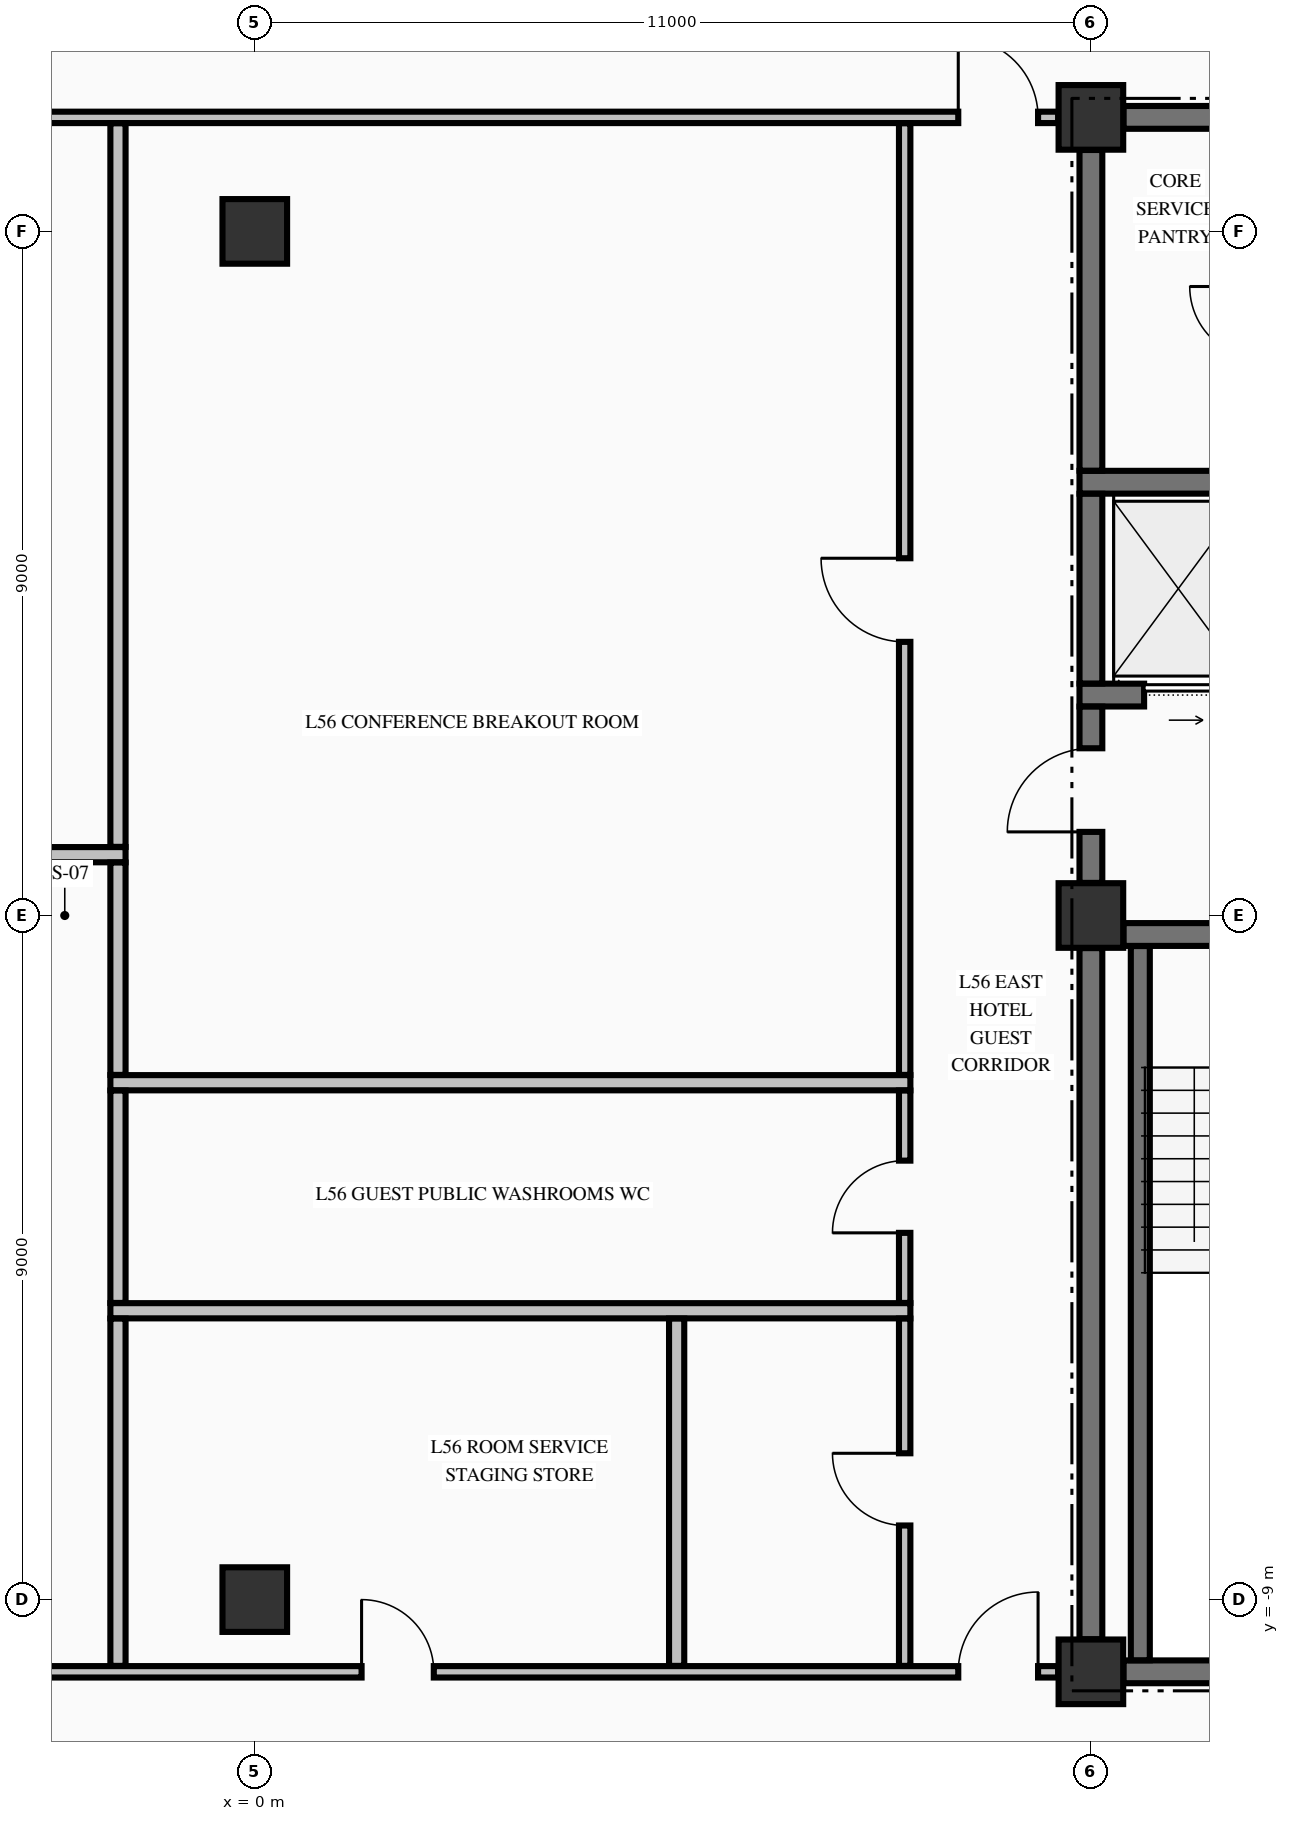
"""IFC4 building model, lengths in metres.
Left out: names, types, materials, properties, quantities, classifications, styles, units other than length and angle.
Written with IfcOpenShell. Run it as: python <this file> out.ifc"""

import sys

from ifc_helpers import new_model, si_unit, direction, frame, frame_2d, origin, origin_2d, place, context, subcontext, project, spatial, rectangle, extrude, element, fill, save


model = new_model("IFC4")
c1 = context("Model", 3, precision=1e-05, world=origin(), true_north=direction((0.0, 1.0)))
c2 = subcontext(c1, "Body", "Model", "MODEL_VIEW")
j1 = project(units=[si_unit("LENGTHUNIT", "METRE"), si_unit("PLANEANGLEUNIT", "RADIAN")], contexts=[c1])
p1 = place(None, origin())
s1 = spatial("IfcSite", under=j1, at=p1, CompositionType="ELEMENT")
p2 = place(p1, origin())
s2 = spatial("IfcBuilding", under=s1, at=p2, CompositionType="ELEMENT")
p3 = place(p2, frame((0.0, 0.0, 215.26)))
s3 = spatial("IfcBuildingStorey", under=s2, at=p3, CompositionType="ELEMENT", Elevation=215.26)
for number, where, z_axis, x_axis in (
    (1, (11.0, -9.95, -0.25), (0.0, 0.0, 1.0), (1.0, 0.0, 0.0)),
    (2, (11.0, 0.0, -0.25), (0.0, 0.0, 1.0), (1.0, 0.0, 0.0)),
    (3, (11.0, 10.5, -0.25), (0.0, 0.0, 1.0), (1.0, 0.0, 0.0)),
    (4, (0.0, -9.0, -0.25), (0.0, 0.0, 1.0), (1.0, 0.0, 0.0)),
    (5, (0.0, 9.0, -0.25), (0.0, 0.0, 1.0), (1.0, 0.0, 0.0)),
):
    element("IfcColumn", number, at=place(p3, frame(where, z_axis=z_axis, x_axis=x_axis)), inside=s3, PredefinedType="COLUMN", context=c2, shape_type="SweptSolid", body=[
        extrude(rectangle(XDim=0.85, YDim=0.85, at=origin_2d()), origin(), (0.0, 0.0, 1.0), 3.4),
    ])
p4 = place(p3, frame((11.429, -9.95, 0.0), z_axis=(0.0, 0.0, 1.0), x_axis=(1.0, 0.0, 0.0)))
e6 = element("IfcWall", 6, at=p4, inside=s3, PredefinedType="SHEAR", context=c2, shape_type="SweptSolid", body=[
    extrude(rectangle(XDim=3.271, YDim=0.3, at=frame_2d((1.635, 0.0))), origin(), (0.0, 0.0, 1.0), 3.15),
])
p5 = place(p3, frame((11.429, -0.25, 0.0), z_axis=(0.0, 0.0, 1.0), x_axis=(1.0, 0.0, 0.0)))
e7 = element("IfcWall", 7, at=p5, inside=s3, PredefinedType="SHEAR", context=c2, shape_type="SweptSolid", body=[
    extrude(rectangle(XDim=3.446, YDim=0.3, at=frame_2d((1.723, 0.0))), origin(), (0.0, 0.0, 1.0), 3.15),
])
p6 = place(p5, frame((1.171, 0.0, 0.0)))
e8 = element("IfcOpeningElement", 8, at=p6, cuts=e7, PredefinedType="OPENING", context=c2, shape_type="SweptSolid", body=[
    extrude(rectangle(XDim=1.1, YDim=2.15, at=frame_2d((0.55, 1.075))), frame((0.0, 0.16, 0.0), z_axis=(0.0, -1.0, 0.0), x_axis=(1.0, 0.0, 0.0)), (0.0, 0.0, 1.0), 0.32),
])
p7 = place(p3, frame((10.85, 2.9, 0.0), z_axis=(0.0, 0.0, 1.0), x_axis=(1.0, 0.0, 0.0)))
e9 = element("IfcWall", 9, at=p7, inside=s3, PredefinedType="SHEAR", context=c2, shape_type="SweptSolid", body=[
    extrude(rectangle(XDim=4.025, YDim=0.3, at=frame_2d((2.012, 0.0))), origin(), (0.0, 0.0, 1.0), 3.15),
])
p8 = place(p7, frame((0.85, 0.0, 0.0)))
e10 = element("IfcOpeningElement", 10, at=p8, cuts=e9, PredefinedType="OPENING", context=c2, shape_type="SweptSolid", body=[
    extrude(rectangle(XDim=1.1, YDim=2.2, at=frame_2d((0.55, 1.1))), frame((0.0, 0.16, 0.0), z_axis=(0.0, -1.0, 0.0), x_axis=(1.0, 0.0, 0.0)), (0.0, 0.0, 1.0), 0.32),
])
p9 = place(p3, frame((10.85, 5.7, 0.0), z_axis=(0.0, 0.0, 1.0), x_axis=(1.0, 0.0, 0.0)))
e11 = element("IfcWall", 11, at=p9, inside=s3, PredefinedType="SHEAR", context=c2, shape_type="SweptSolid", body=[
    extrude(rectangle(XDim=4.025, YDim=0.3, at=frame_2d((2.012, 0.0))), origin(), (0.0, 0.0, 1.0), 3.15),
])
p10 = place(p3, frame((11.429, 10.5, 0.0), z_axis=(0.0, 0.0, 1.0), x_axis=(1.0, 0.0, 0.0)))
e12 = element("IfcWall", 12, at=p10, inside=s3, PredefinedType="SHEAR", context=c2, shape_type="SweptSolid", body=[
    extrude(rectangle(XDim=3.271, YDim=0.3, at=frame_2d((1.635, 0.0))), origin(), (0.0, 0.0, 1.0), 3.15),
])
p11 = place(p10, frame((2.076, 0.0, 0.0)))
e13 = element("IfcOpeningElement", 13, at=p11, cuts=e12, PredefinedType="OPENING", context=c2, shape_type="SweptSolid", body=[
    extrude(rectangle(XDim=0.95, YDim=2.15, at=frame_2d((0.475, 1.075))), frame((0.0, 0.16, 0.0), z_axis=(0.0, -1.0, 0.0), x_axis=(1.0, 0.0, 0.0)), (0.0, 0.0, 1.0), 0.32),
])
p12 = place(p3, frame((-10.569, -9.95, 0.0), z_axis=(0.0, 0.0, 1.0), x_axis=(1.0, 0.0, 0.0)))
e14 = element("IfcWall", 14, at=p12, inside=s3, PredefinedType="PARTITIONING", context=c2, shape_type="SweptSolid", body=[
    extrude(rectangle(XDim=21.138, YDim=0.15, at=frame_2d((10.569, 0.0))), origin(), (0.0, 0.0, 1.0), 3.15),
])
p13 = place(p12, frame((0.264, 0.0, 0.0)))
e15 = element("IfcOpeningElement", 15, at=p13, cuts=e14, PredefinedType="OPENING", context=c2, shape_type="SweptSolid", body=[
    extrude(rectangle(XDim=1.05, YDim=2.15, at=frame_2d((0.525, 1.075))), frame((0.0, 0.085, 0.0), z_axis=(0.0, -1.0, 0.0), x_axis=(1.0, 0.0, 0.0)), (0.0, 0.0, 1.0), 0.17),
])
p14 = place(p12, frame((19.824, 0.0, 0.0)))
e16 = element("IfcOpeningElement", 16, at=p14, cuts=e14, PredefinedType="OPENING", context=c2, shape_type="SweptSolid", body=[
    extrude(rectangle(XDim=1.05, YDim=2.15, at=frame_2d((0.525, 1.075))), frame((0.0, 0.085, 0.0), z_axis=(0.0, -1.0, 0.0), x_axis=(1.0, 0.0, 0.0)), (0.0, 0.0, 1.0), 0.17),
])
p15 = place(p12, frame((11.974, 0.0, 0.0)))
e17 = element("IfcOpeningElement", 17, at=p15, cuts=e14, PredefinedType="OPENING", context=c2, shape_type="SweptSolid", body=[
    extrude(rectangle(XDim=0.95, YDim=2.15, at=frame_2d((0.475, 1.075))), frame((0.0, 0.085, 0.0), z_axis=(0.0, -1.0, 0.0), x_axis=(1.0, 0.0, 0.0)), (0.0, 0.0, 1.0), 0.17),
])
for number, where, z_axis, x_axis in (
    (18, (-1.9, -5.2, 0.0), (0.0, 0.0, 1.0), (1.0, 0.0, 0.0)),
    (19, (-1.9, -2.2, 0.0), (0.0, 0.0, 1.0), (1.0, 0.0, 0.0)),
):
    element("IfcWall", number, at=place(p3, frame(where, z_axis=z_axis, x_axis=x_axis)), inside=s3, PredefinedType="PARTITIONING", context=c2, shape_type="SweptSolid", body=[
        extrude(rectangle(XDim=10.525, YDim=0.2, at=frame_2d((5.262, 0.0))), origin(), (0.0, 0.0, 1.0), 3.15),
    ])
p16 = place(p3, frame((-8.625, 0.8, 0.0), z_axis=(0.0, 0.0, 1.0), x_axis=(1.0, 0.0, 0.0)))
e20 = element("IfcWall", 20, at=p16, inside=s3, PredefinedType="PARTITIONING", context=c2, shape_type="SweptSolid", body=[
    extrude(rectangle(XDim=6.925, YDim=0.2, at=frame_2d((3.462, 0.0))), origin(), (0.0, 0.0, 1.0), 3.15),
])
p17 = place(p3, frame((-10.569, 10.5, 0.0), z_axis=(0.0, 0.0, 1.0), x_axis=(1.0, 0.0, 0.0)))
e21 = element("IfcWall", 21, at=p17, inside=s3, PredefinedType="PARTITIONING", context=c2, shape_type="SweptSolid", body=[
    extrude(rectangle(XDim=21.138, YDim=0.15, at=frame_2d((10.569, 0.0))), origin(), (0.0, 0.0, 1.0), 3.15),
])
p18 = place(p17, frame((0.264, 0.0, 0.0)))
e22 = element("IfcOpeningElement", 22, at=p18, cuts=e21, PredefinedType="OPENING", context=c2, shape_type="SweptSolid", body=[
    extrude(rectangle(XDim=1.05, YDim=2.15, at=frame_2d((0.525, 1.075))), frame((0.0, 0.085, 0.0), z_axis=(0.0, -1.0, 0.0), x_axis=(1.0, 0.0, 0.0)), (0.0, 0.0, 1.0), 0.17),
])
p19 = place(p17, frame((19.824, 0.0, 0.0)))
e23 = element("IfcOpeningElement", 23, at=p19, cuts=e21, PredefinedType="OPENING", context=c2, shape_type="SweptSolid", body=[
    extrude(rectangle(XDim=1.05, YDim=2.15, at=frame_2d((0.525, 1.075))), frame((0.0, 0.085, 0.0), z_axis=(0.0, -1.0, 0.0), x_axis=(1.0, 0.0, 0.0)), (0.0, 0.0, 1.0), 0.17),
])
p20 = place(p3, frame((11.0, -9.521, 0.0), z_axis=(0.0, 0.0, 1.0), x_axis=(0.0, 1.0, 0.0)))
e24 = element("IfcWall", 24, at=p20, inside=s3, PredefinedType="SHEAR", context=c2, shape_type="SweptSolid", body=[
    extrude(rectangle(XDim=9.092, YDim=0.3, at=frame_2d((4.546, 0.0))), origin(), (0.0, 0.0, 1.0), 3.15),
])
p21 = place(p3, frame((11.0, 0.429, 0.0), z_axis=(0.0, 0.0, 1.0), x_axis=(0.0, 1.0, 0.0)))
e25 = element("IfcWall", 25, at=p21, inside=s3, PredefinedType="SHEAR", context=c2, shape_type="SweptSolid", body=[
    extrude(rectangle(XDim=2.319, YDim=0.3, at=frame_2d((1.16, 0.0))), origin(), (0.0, 0.0, 1.0), 3.15),
])
p22 = place(p21, frame((0.671, 0.0, 0.0)))
e26 = element("IfcOpeningElement", 26, at=p22, cuts=e25, PredefinedType="OPENING", context=c2, shape_type="SweptSolid", body=[
    extrude(rectangle(XDim=1.1, YDim=2.15, at=frame_2d((0.55, 1.075))), frame((0.0, 0.16, 0.0), z_axis=(0.0, -1.0, 0.0), x_axis=(1.0, 0.0, 0.0)), (0.0, 0.0, 1.0), 0.32),
])
p23 = place(p3, frame((11.0, 3.052, 0.0), z_axis=(0.0, 0.0, 1.0), x_axis=(0.0, 1.0, 0.0)))
e27 = element("IfcWall", 27, at=p23, inside=s3, PredefinedType="SHEAR", context=c2, shape_type="SweptSolid", body=[
    extrude(rectangle(XDim=2.496, YDim=0.3, at=frame_2d((1.248, 0.0))), origin(), (0.0, 0.0, 1.0), 3.15),
])
p24 = place(p3, frame((11.0, 5.852, 0.0), z_axis=(0.0, 0.0, 1.0), x_axis=(0.0, 1.0, 0.0)))
e28 = element("IfcWall", 28, at=p24, inside=s3, PredefinedType="SHEAR", context=c2, shape_type="SweptSolid", body=[
    extrude(rectangle(XDim=4.219, YDim=0.3, at=frame_2d((2.109, 0.0))), origin(), (0.0, 0.0, 1.0), 3.15),
])
p25 = place(p3, frame((11.65, -9.798, 0.0), z_axis=(0.0, 0.0, 1.0), x_axis=(0.0, 1.0, 0.0)))
e29 = element("IfcWall", 29, at=p25, inside=s3, PredefinedType="SOLIDWALL", context=c2, shape_type="SweptSolid", body=[
    extrude(rectangle(XDim=9.396, YDim=0.25, at=frame_2d((4.698, 0.0))), origin(), (0.0, 0.0, 1.0), 3.15),
])
p26 = place(p3, frame((-1.8, -9.872, 0.0), z_axis=(0.0, 0.0, 1.0), x_axis=(0.0, 1.0, 0.0)))
e30 = element("IfcWall", 30, at=p26, inside=s3, PredefinedType="PARTITIONING", context=c2, shape_type="SweptSolid", body=[
    extrude(rectangle(XDim=4.569, YDim=0.2, at=frame_2d((2.285, 0.0))), origin(), (0.0, 0.0, 1.0), 3.15),
])
for number, where, z_axis, x_axis in (
    (31, (-1.8, -5.097, 0.0), (0.0, 0.0, 1.0), (0.0, 1.0, 0.0)),
    (32, (-1.8, -2.097, 0.0), (0.0, 0.0, 1.0), (0.0, 1.0, 0.0)),
):
    element("IfcWall", number, at=place(p3, frame(where, z_axis=z_axis, x_axis=x_axis)), inside=s3, PredefinedType="PARTITIONING", context=c2, shape_type="SweptSolid", body=[
        extrude(rectangle(XDim=2.794, YDim=0.2, at=frame_2d((1.397, 0.0))), origin(), (0.0, 0.0, 1.0), 3.15),
    ])
p27 = place(p3, frame((-1.8, 0.903, 0.0), z_axis=(0.0, 0.0, 1.0), x_axis=(0.0, 1.0, 0.0)))
e33 = element("IfcWall", 33, at=p27, inside=s3, PredefinedType="PARTITIONING", context=c2, shape_type="SweptSolid", body=[
    extrude(rectangle(XDim=9.519, YDim=0.2, at=frame_2d((4.76, 0.0))), origin(), (0.0, 0.0, 1.0), 3.15),
])
p28 = place(p3, frame((5.55, -9.872, 0.0), z_axis=(0.0, 0.0, 1.0), x_axis=(0.0, 1.0, 0.0)))
e34 = element("IfcWall", 34, at=p28, inside=s3, PredefinedType="PARTITIONING", context=c2, shape_type="SweptSolid", body=[
    extrude(rectangle(XDim=4.569, YDim=0.2, at=frame_2d((2.285, 0.0))), origin(), (0.0, 0.0, 1.0), 3.15),
])
p29 = place(p3, frame((8.55, -9.872, 0.0), z_axis=(0.0, 0.0, 1.0), x_axis=(0.0, 1.0, 0.0)))
e35 = element("IfcWall", 35, at=p29, inside=s3, PredefinedType="PARTITIONING", context=c2, shape_type="SweptSolid", body=[
    extrude(rectangle(XDim=4.569, YDim=0.15, at=frame_2d((2.285, 0.0))), origin(), (0.0, 0.0, 1.0), 3.15),
])
p30 = place(p29, frame((1.847, 0.0, 0.0)))
e36 = element("IfcOpeningElement", 36, at=p30, cuts=e35, PredefinedType="OPENING", context=c2, shape_type="SweptSolid", body=[
    extrude(rectangle(XDim=0.95, YDim=2.15, at=frame_2d((0.475, 1.075))), frame((0.0, 0.085, 0.0), z_axis=(0.0, -1.0, 0.0), x_axis=(1.0, 0.0, 0.0)), (0.0, 0.0, 1.0), 0.17),
])
p31 = place(p3, frame((8.55, -5.097, 0.0), z_axis=(0.0, 0.0, 1.0), x_axis=(0.0, 1.0, 0.0)))
e37 = element("IfcWall", 37, at=p31, inside=s3, PredefinedType="PARTITIONING", context=c2, shape_type="SweptSolid", body=[
    extrude(rectangle(XDim=2.794, YDim=0.15, at=frame_2d((1.397, 0.0))), origin(), (0.0, 0.0, 1.0), 3.15),
])
p32 = place(p31, frame((0.922, 0.0, 0.0)))
e38 = element("IfcOpeningElement", 38, at=p32, cuts=e37, PredefinedType="OPENING", context=c2, shape_type="SweptSolid", body=[
    extrude(rectangle(XDim=0.95, YDim=2.15, at=frame_2d((0.475, 1.075))), frame((0.0, 0.085, 0.0), z_axis=(0.0, -1.0, 0.0), x_axis=(1.0, 0.0, 0.0)), (0.0, 0.0, 1.0), 0.17),
])
p33 = place(p3, frame((8.55, -2.097, 0.0), z_axis=(0.0, 0.0, 1.0), x_axis=(0.0, 1.0, 0.0)))
e39 = element("IfcWall", 39, at=p33, inside=s3, PredefinedType="PARTITIONING", context=c2, shape_type="SweptSolid", body=[
    extrude(rectangle(XDim=12.519, YDim=0.15, at=frame_2d((6.26, 0.0))), origin(), (0.0, 0.0, 1.0), 3.15),
])
p34 = place(p33, frame((5.697, 0.0, 0.0)))
e40 = element("IfcOpeningElement", 40, at=p34, cuts=e39, PredefinedType="OPENING", context=c2, shape_type="SweptSolid", body=[
    extrude(rectangle(XDim=1.1, YDim=2.15, at=frame_2d((0.55, 1.075))), frame((0.0, 0.085, 0.0), z_axis=(0.0, -1.0, 0.0), x_axis=(1.0, 0.0, 0.0)), (0.0, 0.0, 1.0), 0.17),
])
p35 = place(p22, origin())
e41 = element("IfcDoor", 41, at=p35, inside=s3, OperationType="SINGLE_SWING_LEFT", PredefinedType="DOOR", context=c2, shape_type="SweptSolid", body=[
    extrude(rectangle(XDim=1.1, YDim=2.15, at=frame_2d((0.55, 1.075))), frame((0.0, 0.025, 0.0), z_axis=(0.0, -1.0, 0.0), x_axis=(1.0, 0.0, 0.0)), (0.0, 0.0, 1.0), 0.05),
])
fill(e26, e41)
p36 = place(p8, origin())
e42 = element("IfcDoor", 42, at=p36, inside=s3, OperationType="SLIDING_TO_RIGHT", PredefinedType="DOOR", context=c2, shape_type="SweptSolid", body=[
    extrude(rectangle(XDim=1.1, YDim=2.2, at=frame_2d((0.55, 1.1))), frame((0.0, 0.025, 0.0), z_axis=(0.0, -1.0, 0.0), x_axis=(1.0, 0.0, 0.0)), (0.0, 0.0, 1.0), 0.05),
])
fill(e10, e42)
p37 = place(p19, origin())
e43 = element("IfcDoor", 43, at=p37, inside=s3, OperationType="SINGLE_SWING_LEFT", PredefinedType="DOOR", context=c2, shape_type="SweptSolid", body=[
    extrude(rectangle(XDim=1.05, YDim=2.15, at=frame_2d((0.525, 1.075))), frame((0.0, 0.025, 0.0), z_axis=(0.0, -1.0, 0.0), x_axis=(1.0, 0.0, 0.0)), (0.0, 0.0, 1.0), 0.05),
])
fill(e23, e43)
p38 = place(p14, origin())
e44 = element("IfcDoor", 44, at=p38, inside=s3, OperationType="SINGLE_SWING_RIGHT", PredefinedType="DOOR", context=c2, shape_type="SweptSolid", body=[
    extrude(rectangle(XDim=1.05, YDim=2.15, at=frame_2d((0.525, 1.075))), frame((0.0, 0.025, 0.0), z_axis=(0.0, -1.0, 0.0), x_axis=(1.0, 0.0, 0.0)), (0.0, 0.0, 1.0), 0.05),
])
fill(e16, e44)
p39 = place(p34, origin())
e45 = element("IfcDoor", 45, at=p39, inside=s3, OperationType="SINGLE_SWING_RIGHT", PredefinedType="DOOR", context=c2, shape_type="SweptSolid", body=[
    extrude(rectangle(XDim=1.1, YDim=2.15, at=frame_2d((0.55, 1.075))), frame((0.0, 0.025, 0.0), z_axis=(0.0, -1.0, 0.0), x_axis=(1.0, 0.0, 0.0)), (0.0, 0.0, 1.0), 0.05),
])
fill(e40, e45)
p40 = place(p32, origin())
e46 = element("IfcDoor", 46, at=p40, inside=s3, OperationType="SINGLE_SWING_LEFT", PredefinedType="DOOR", context=c2, shape_type="SweptSolid", body=[
    extrude(rectangle(XDim=0.95, YDim=2.15, at=frame_2d((0.475, 1.075))), frame((0.0, 0.025, 0.0), z_axis=(0.0, -1.0, 0.0), x_axis=(1.0, 0.0, 0.0)), (0.0, 0.0, 1.0), 0.05),
])
fill(e38, e46)
p41 = place(p30, origin())
e47 = element("IfcDoor", 47, at=p41, inside=s3, OperationType="SINGLE_SWING_RIGHT", PredefinedType="DOOR", context=c2, shape_type="SweptSolid", body=[
    extrude(rectangle(XDim=0.95, YDim=2.15, at=frame_2d((0.475, 1.075))), frame((0.0, 0.025, 0.0), z_axis=(0.0, -1.0, 0.0), x_axis=(1.0, 0.0, 0.0)), (0.0, 0.0, 1.0), 0.05),
])
fill(e36, e47)
p42 = place(p15, origin())
e48 = element("IfcDoor", 48, at=p42, inside=s3, OperationType="SINGLE_SWING_LEFT", PredefinedType="DOOR", context=c2, shape_type="SweptSolid", body=[
    extrude(rectangle(XDim=0.95, YDim=2.15, at=frame_2d((0.475, 1.075))), frame((0.0, 0.025, 0.0), z_axis=(0.0, -1.0, 0.0), x_axis=(1.0, 0.0, 0.0)), (0.0, 0.0, 1.0), 0.05),
])
fill(e17, e48)
save(model, sys.argv[1])
